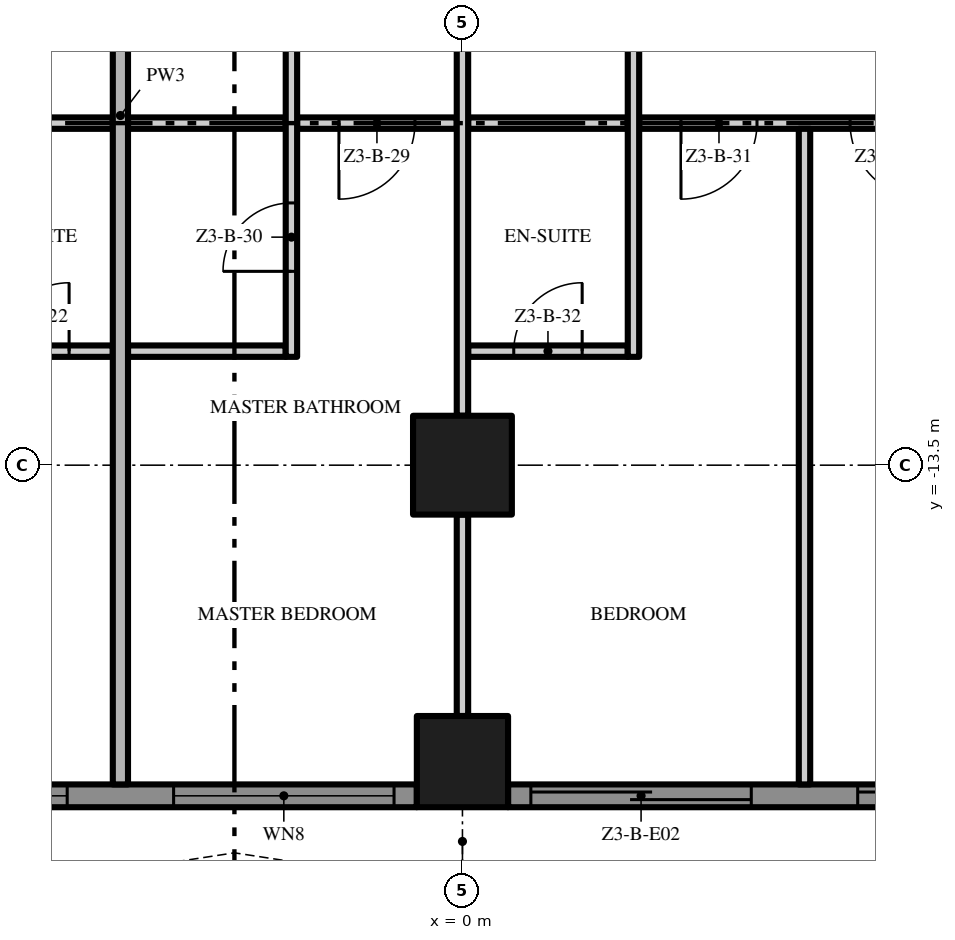
"""IFC4 building model, lengths in metres.
Left out: names, types, materials, properties, quantities, classifications, styles, units other than length and angle.
Written with IfcOpenShell. Run it as: python <this file> out.ifc"""

import sys

from ifc_helpers import new_model, si_unit, direction, frame, frame_2d, origin, origin_2d, place, context, subcontext, project, spatial, polyline, rectangle, outline, extrude, element, fill, save


model = new_model("IFC4")
c1 = context("Model", 3, precision=1e-05, world=origin(), true_north=direction((0.0, 1.0)))
c2 = subcontext(c1, "Body", "Model", "MODEL_VIEW")
j1 = project(units=[si_unit("LENGTHUNIT", "METRE"), si_unit("PLANEANGLEUNIT", "RADIAN")], contexts=[c1])
p1 = place(None, origin())
s1 = spatial("IfcSite", under=j1, at=p1, CompositionType="ELEMENT")
p2 = place(p1, origin())
s2 = spatial("IfcBuilding", under=s1, at=p2, CompositionType="ELEMENT")
p3 = place(p2, frame((0.0, 0.0, 136.4)))
s3 = spatial("IfcBuildingStorey", under=s2, at=p3, CompositionType="ELEMENT", Elevation=136.4)
p4 = place(p3, frame((0.0, -13.5, 0.0), z_axis=(0.0, 0.0, 1.0), x_axis=(1.0, 0.0, 0.0)))
e1 = element("IfcColumn", 1, at=p4, inside=s3, PredefinedType="COLUMN", context=c2, shape_type="SweptSolid", body=[
    extrude(rectangle(XDim=1.3, YDim=1.3, at=origin_2d()), origin(), (0.0, 0.0, 1.0), 3.5),
])
p5 = place(p3, frame((0.0, -17.4, 0.0), z_axis=(0.0, 0.0, 1.0), x_axis=(1.0, 0.0, 0.0)))
e2 = element("IfcColumn", 2, at=p5, inside=s3, PredefinedType="COLUMN", context=c2, shape_type="SweptSolid", body=[
    extrude(rectangle(XDim=1.2, YDim=1.2, at=origin_2d()), origin(), (0.0, 0.0, 1.0), 3.5),
])
p6 = place(p3, frame((-0.6, -17.85, 0.0), z_axis=(0.0, 0.0, 1.0), x_axis=(-1.0, 0.0, 0.0)))
e3 = element("IfcWall", 3, at=p6, inside=s3, PredefinedType="SOLIDWALL", context=c2, shape_type="SweptSolid", body=[
    extrude(rectangle(XDim=7.8, YDim=0.3, at=frame_2d((3.9, 0.0))), origin(), (0.0, 0.0, 1.0), 3.5),
])
p7 = place(p6, frame((4.6, 0.0, 0.45)))
e4 = element("IfcOpeningElement", 4, at=p7, cuts=e3, PredefinedType="OPENING", context=c2, shape_type="SweptSolid", body=[
    extrude(rectangle(XDim=2.9, YDim=2.65, at=frame_2d((1.45, 1.325))), frame((0.0, 0.16, 0.0), z_axis=(0.0, -1.0, 0.0), x_axis=(1.0, 0.0, 0.0)), (0.0, 0.0, 1.0), 0.32),
])
p8 = place(p6, frame((0.3, 0.0, 0.45)))
e5 = element("IfcOpeningElement", 5, at=p8, cuts=e3, PredefinedType="OPENING", context=c2, shape_type="SweptSolid", body=[
    extrude(rectangle(XDim=2.9, YDim=2.65, at=frame_2d((1.45, 1.325))), frame((0.0, 0.16, 0.0), z_axis=(0.0, -1.0, 0.0), x_axis=(1.0, 0.0, 0.0)), (0.0, 0.0, 1.0), 0.32),
])
p9 = place(p3, frame((8.4, -17.85, 0.0), z_axis=(0.0, 0.0, 1.0), x_axis=(-1.0, 0.0, 0.0)))
e6 = element("IfcWall", 6, at=p9, inside=s3, PredefinedType="SOLIDWALL", context=c2, shape_type="SweptSolid", body=[
    extrude(rectangle(XDim=7.8, YDim=0.3, at=frame_2d((3.9, 0.0))), origin(), (0.0, 0.0, 1.0), 3.5),
])
p10 = place(p9, frame((4.6, 0.0, 0.0)))
e7 = element("IfcOpeningElement", 7, at=p10, cuts=e6, PredefinedType="OPENING", context=c2, shape_type="SweptSolid", body=[
    extrude(rectangle(XDim=2.9, YDim=2.4, at=frame_2d((1.45, 1.2))), frame((0.0, 0.16, 0.0), z_axis=(0.0, -1.0, 0.0), x_axis=(1.0, 0.0, 0.0)), (0.0, 0.0, 1.0), 0.32),
])
p11 = place(p9, frame((0.3, 0.0, 0.0)))
e8 = element("IfcOpeningElement", 8, at=p11, cuts=e6, PredefinedType="OPENING", context=c2, shape_type="SweptSolid", body=[
    extrude(rectangle(XDim=2.9, YDim=2.4, at=frame_2d((1.45, 1.2))), frame((0.0, 0.16, 0.0), z_axis=(0.0, -1.0, 0.0), x_axis=(1.0, 0.0, 0.0)), (0.0, 0.0, 1.0), 0.32),
])
p12 = place(p3, origin())
e9 = element("IfcWall", 9, at=p12, inside=s3, PredefinedType="USERDEFINED", context=c2, shape_type="SweptSolid", body=[
    extrude(outline(polyline([(-18.0, -18.6), (-16.5, -18.829), (-15.0, -19.429), (-13.5, -20.171), (-12.0, -20.771), (-10.5, -21.0), (-9.0, -20.771), (-7.5, -20.171), (-6.0, -19.429), (-4.5, -18.829), (-3.0, -18.6), (-1.5, -18.829), (0.0, -19.429), (1.5, -20.171), (3.0, -20.771), (4.5, -21.0), (6.0, -20.771), (7.5, -20.171), (9.0, -19.429), (10.5, -18.829), (12.0, -18.6), (13.5, -18.829), (15.0, -19.429), (16.5, -20.171), (18.0, -20.771), (18.093, -20.539), (16.602, -19.942), (15.102, -19.201), (13.566, -18.586), (12.0, -18.347), (10.434, -18.586), (8.898, -19.201), (7.398, -19.942), (5.934, -20.528), (4.5, -20.747), (3.066, -20.528), (1.602, -19.942), (0.102, -19.201), (-1.434, -18.586), (-3.0, -18.347), (-4.566, -18.586), (-6.102, -19.201), (-7.602, -19.942), (-9.066, -20.528), (-10.5, -20.747), (-11.934, -20.528), (-13.398, -19.942), (-14.898, -19.201), (-16.434, -18.586), (-17.962, -18.353), (-18.0, -18.6)])), origin(), (0.0, 0.0, 1.0), 0.9),
])
p13 = place(p3, frame((-6.675, -12.0, 0.0), z_axis=(0.0, 0.0, 1.0), x_axis=(1.0, 0.0, 0.0)))
e10 = element("IfcWall", 10, at=p13, inside=s3, PredefinedType="PARTITIONING", context=c2, shape_type="SweptSolid", body=[
    extrude(rectangle(XDim=2.075, YDim=0.15, at=frame_2d((1.038, 0.0))), origin(), (0.0, 0.0, 1.0), 3.5),
])
p14 = place(p13, frame((0.6, 0.0, 0.0)))
e11 = element("IfcOpeningElement", 11, at=p14, cuts=e10, PredefinedType="OPENING", context=c2, shape_type="SweptSolid", body=[
    extrude(rectangle(XDim=0.9, YDim=2.1, at=frame_2d((0.45, 1.05))), frame((0.0, 0.085, 0.0), z_axis=(0.0, -1.0, 0.0), x_axis=(1.0, 0.0, 0.0)), (0.0, 0.0, 1.0), 0.17),
])
p15 = place(p3, frame((-4.4, -12.0, 0.0), z_axis=(0.0, 0.0, 1.0), x_axis=(1.0, 0.0, 0.0)))
e12 = element("IfcWall", 12, at=p15, inside=s3, PredefinedType="PARTITIONING", context=c2, shape_type="SweptSolid", body=[
    extrude(rectangle(XDim=2.075, YDim=0.15, at=frame_2d((1.038, 0.0))), origin(), (0.0, 0.0, 1.0), 3.5),
])
p16 = place(p3, frame((0.075, -12.0, 0.0), z_axis=(0.0, 0.0, 1.0), x_axis=(1.0, 0.0, 0.0)))
e13 = element("IfcWall", 13, at=p16, inside=s3, PredefinedType="PARTITIONING", context=c2, shape_type="SweptSolid", body=[
    extrude(rectangle(XDim=2.1, YDim=0.15, at=frame_2d((1.05, 0.0))), origin(), (0.0, 0.0, 1.0), 3.5),
])
p17 = place(p16, frame((0.6, 0.0, 0.0)))
e14 = element("IfcOpeningElement", 14, at=p17, cuts=e13, PredefinedType="OPENING", context=c2, shape_type="SweptSolid", body=[
    extrude(rectangle(XDim=0.9, YDim=2.1, at=frame_2d((0.45, 1.05))), frame((0.0, 0.085, 0.0), z_axis=(0.0, -1.0, 0.0), x_axis=(1.0, 0.0, 0.0)), (0.0, 0.0, 1.0), 0.17),
])
for number, where, z_axis, x_axis in (
    (15, (-6.675, -9.0, 0.0), (0.0, 0.0, 1.0), (1.0, 0.0, 0.0)),
    (16, (-4.4, -9.0, 0.0), (0.0, 0.0, 1.0), (1.0, 0.0, 0.0)),
):
    element("IfcWall", number, at=place(p3, frame(where, z_axis=z_axis, x_axis=x_axis)), inside=s3, PredefinedType="PARTITIONING", context=c2, shape_type="SweptSolid", body=[
        extrude(rectangle(XDim=2.075, YDim=0.15, at=frame_2d((1.038, 0.0))), origin(), (0.0, 0.0, 1.0), 3.5),
    ])
p18 = place(p3, frame((-0.075, -9.0, 0.0), z_axis=(0.0, 0.0, 1.0), x_axis=(-1.0, 0.0, 0.0)))
e17 = element("IfcWall", 17, at=p18, inside=s3, PredefinedType="PARTITIONING", context=c2, shape_type="SweptSolid", body=[
    extrude(rectangle(XDim=2.1, YDim=0.15, at=frame_2d((1.05, 0.0))), origin(), (0.0, 0.0, 1.0), 3.5),
])
p19 = place(p18, frame((0.55, 0.0, 0.0)))
e18 = element("IfcOpeningElement", 18, at=p19, cuts=e17, PredefinedType="OPENING", context=c2, shape_type="SweptSolid", body=[
    extrude(rectangle(XDim=1.0, YDim=2.4, at=frame_2d((0.5, 1.2))), frame((0.0, 0.085, 0.0), z_axis=(0.0, -1.0, 0.0), x_axis=(1.0, 0.0, 0.0)), (0.0, 0.0, 1.0), 0.17),
])
p20 = place(p3, frame((0.075, -9.0, 0.0), z_axis=(0.0, 0.0, 1.0), x_axis=(1.0, 0.0, 0.0)))
e19 = element("IfcWall", 19, at=p20, inside=s3, PredefinedType="PARTITIONING", context=c2, shape_type="SweptSolid", body=[
    extrude(rectangle(XDim=2.1, YDim=0.15, at=frame_2d((1.05, 0.0))), origin(), (0.0, 0.0, 1.0), 3.5),
])
p21 = place(p3, frame((6.675, -9.0, 0.0), z_axis=(0.0, 0.0, 1.0), x_axis=(-1.0, 0.0, 0.0)))
e20 = element("IfcWall", 20, at=p21, inside=s3, PredefinedType="PARTITIONING", context=c2, shape_type="SweptSolid", body=[
    extrude(rectangle(XDim=4.35, YDim=0.15, at=frame_2d((2.175, 0.0))), origin(), (0.0, 0.0, 1.0), 3.5),
])
p22 = place(p21, frame((2.8, 0.0, 0.0)))
e21 = element("IfcOpeningElement", 21, at=p22, cuts=e20, PredefinedType="OPENING", context=c2, shape_type="SweptSolid", body=[
    extrude(rectangle(XDim=1.0, YDim=2.4, at=frame_2d((0.5, 1.2))), frame((0.0, 0.085, 0.0), z_axis=(0.0, -1.0, 0.0), x_axis=(1.0, 0.0, 0.0)), (0.0, 0.0, 1.0), 0.17),
])
p23 = place(p21, frame((0.575, 0.0, 0.0)))
e22 = element("IfcOpeningElement", 22, at=p23, cuts=e20, PredefinedType="OPENING", context=c2, shape_type="SweptSolid", body=[
    extrude(rectangle(XDim=1.0, YDim=2.4, at=frame_2d((0.5, 1.2))), frame((0.0, 0.085, 0.0), z_axis=(0.0, -1.0, 0.0), x_axis=(1.0, 0.0, 0.0)), (0.0, 0.0, 1.0), 0.17),
])
p24 = place(p3, frame((-4.5, -17.7, 0.0), z_axis=(0.0, 0.0, 1.0), x_axis=(0.0, 1.0, 0.0)))
e23 = element("IfcWall", 23, at=p24, inside=s3, PredefinedType="PARTITIONING", context=c2, shape_type="SweptSolid", body=[
    extrude(rectangle(XDim=17.6, YDim=0.2, at=frame_2d((8.8, 0.0))), origin(), (0.0, 0.0, 1.0), 3.5),
])
p25 = place(p3, frame((-2.25, -12.075, 0.0), z_axis=(0.0, 0.0, 1.0), x_axis=(0.0, 1.0, 0.0)))
e24 = element("IfcWall", 24, at=p25, inside=s3, PredefinedType="PARTITIONING", context=c2, shape_type="SweptSolid", body=[
    extrude(rectangle(XDim=7.65, YDim=0.15, at=frame_2d((3.825, 0.0))), origin(), (0.0, 0.0, 1.0), 3.5),
])
p26 = place(p25, frame((4.875, 0.0, 0.0)))
e25 = element("IfcOpeningElement", 25, at=p26, cuts=e24, PredefinedType="OPENING", context=c2, shape_type="SweptSolid", body=[
    extrude(rectangle(XDim=0.9, YDim=2.1, at=frame_2d((0.45, 1.05))), frame((0.0, 0.085, 0.0), z_axis=(0.0, -1.0, 0.0), x_axis=(1.0, 0.0, 0.0)), (0.0, 0.0, 1.0), 0.17),
])
p27 = place(p25, frame((1.125, 0.0, 0.0)))
e26 = element("IfcOpeningElement", 26, at=p27, cuts=e24, PredefinedType="OPENING", context=c2, shape_type="SweptSolid", body=[
    extrude(rectangle(XDim=0.9, YDim=2.1, at=frame_2d((0.45, 1.05))), frame((0.0, 0.085, 0.0), z_axis=(0.0, -1.0, 0.0), x_axis=(1.0, 0.0, 0.0)), (0.0, 0.0, 1.0), 0.17),
])
p28 = place(p3, frame((0.0, -16.8, 0.0), z_axis=(0.0, 0.0, 1.0), x_axis=(0.0, 1.0, 0.0)))
e27 = element("IfcWall", 27, at=p28, inside=s3, PredefinedType="PARTITIONING", context=c2, shape_type="SweptSolid", body=[
    extrude(rectangle(XDim=2.65, YDim=0.15, at=frame_2d((1.325, 0.0))), origin(), (0.0, 0.0, 1.0), 3.5),
])
p29 = place(p3, frame((0.0, -12.85, 0.0), z_axis=(0.0, 0.0, 1.0), x_axis=(0.0, 1.0, 0.0)))
e28 = element("IfcWall", 28, at=p29, inside=s3, PredefinedType="PARTITIONING", context=c2, shape_type="SweptSolid", body=[
    extrude(rectangle(XDim=7.7, YDim=0.15, at=frame_2d((3.85, 0.0))), origin(), (0.0, 0.0, 1.0), 3.5),
])
p30 = place(p3, frame((2.25, -12.075, 0.0), z_axis=(0.0, 0.0, 1.0), x_axis=(0.0, 1.0, 0.0)))
e29 = element("IfcWall", 29, at=p30, inside=s3, PredefinedType="PARTITIONING", context=c2, shape_type="SweptSolid", body=[
    extrude(rectangle(XDim=7.65, YDim=0.15, at=frame_2d((3.825, 0.0))), origin(), (0.0, 0.0, 1.0), 3.5),
])
p31 = place(p3, frame((4.5, -17.7, 0.0), z_axis=(0.0, 0.0, 1.0), x_axis=(0.0, 1.0, 0.0)))
e30 = element("IfcWall", 30, at=p31, inside=s3, PredefinedType="PARTITIONING", context=c2, shape_type="SweptSolid", body=[
    extrude(rectangle(XDim=8.625, YDim=0.15, at=frame_2d((4.312, 0.0))), origin(), (0.0, 0.0, 1.0), 3.5),
])
p32 = place(p7, origin())
e31 = element("IfcWindow", 31, at=p32, inside=s3, PartitioningType="SINGLE_PANEL", PredefinedType="WINDOW", context=c2, shape_type="SweptSolid", body=[
    extrude(rectangle(XDim=2.9, YDim=2.65, at=frame_2d((1.45, 1.325))), frame((0.0, 0.03, 0.0), z_axis=(0.0, -1.0, 0.0), x_axis=(1.0, 0.0, 0.0)), (0.0, 0.0, 1.0), 0.06),
])
fill(e4, e31)
p33 = place(p8, origin())
e32 = element("IfcWindow", 32, at=p33, inside=s3, PartitioningType="SINGLE_PANEL", PredefinedType="WINDOW", context=c2, shape_type="SweptSolid", body=[
    extrude(rectangle(XDim=2.9, YDim=2.65, at=frame_2d((1.45, 1.325))), frame((0.0, 0.03, 0.0), z_axis=(0.0, -1.0, 0.0), x_axis=(1.0, 0.0, 0.0)), (0.0, 0.0, 1.0), 0.06),
])
fill(e5, e32)
p34 = place(p10, origin())
e33 = element("IfcDoor", 33, at=p34, inside=s3, OperationType="SINGLE_SWING_LEFT", PredefinedType="DOOR", context=c2, shape_type="SweptSolid", body=[
    extrude(rectangle(XDim=2.9, YDim=2.4, at=frame_2d((1.45, 1.2))), frame((0.0, 0.025, 0.0), z_axis=(0.0, -1.0, 0.0), x_axis=(1.0, 0.0, 0.0)), (0.0, 0.0, 1.0), 0.05),
])
fill(e7, e33)
p35 = place(p11, origin())
e34 = element("IfcDoor", 34, at=p35, inside=s3, OperationType="SINGLE_SWING_LEFT", PredefinedType="DOOR", context=c2, shape_type="SweptSolid", body=[
    extrude(rectangle(XDim=2.9, YDim=2.4, at=frame_2d((1.45, 1.2))), frame((0.0, 0.025, 0.0), z_axis=(0.0, -1.0, 0.0), x_axis=(1.0, 0.0, 0.0)), (0.0, 0.0, 1.0), 0.05),
])
fill(e8, e34)
p36 = place(p14, origin())
e35 = element("IfcDoor", 35, at=p36, inside=s3, OperationType="SINGLE_SWING_RIGHT", PredefinedType="DOOR", context=c2, shape_type="SweptSolid", body=[
    extrude(rectangle(XDim=0.9, YDim=2.1, at=frame_2d((0.45, 1.05))), frame((0.0, 0.025, 0.0), z_axis=(0.0, -1.0, 0.0), x_axis=(1.0, 0.0, 0.0)), (0.0, 0.0, 1.0), 0.05),
])
fill(e11, e35)
p37 = place(p19, origin())
e36 = element("IfcDoor", 36, at=p37, inside=s3, OperationType="SINGLE_SWING_RIGHT", PredefinedType="DOOR", context=c2, shape_type="SweptSolid", body=[
    extrude(rectangle(XDim=1.0, YDim=2.4, at=frame_2d((0.5, 1.2))), frame((0.0, 0.025, 0.0), z_axis=(0.0, -1.0, 0.0), x_axis=(1.0, 0.0, 0.0)), (0.0, 0.0, 1.0), 0.05),
])
fill(e18, e36)
p38 = place(p27, origin())
e37 = element("IfcDoor", 37, at=p38, inside=s3, OperationType="SINGLE_SWING_LEFT", PredefinedType="DOOR", context=c2, shape_type="SweptSolid", body=[
    extrude(rectangle(XDim=0.9, YDim=2.1, at=frame_2d((0.45, 1.05))), frame((0.0, 0.025, 0.0), z_axis=(0.0, -1.0, 0.0), x_axis=(1.0, 0.0, 0.0)), (0.0, 0.0, 1.0), 0.05),
])
fill(e26, e37)
p39 = place(p22, origin())
e38 = element("IfcDoor", 38, at=p39, inside=s3, OperationType="SINGLE_SWING_RIGHT", PredefinedType="DOOR", context=c2, shape_type="SweptSolid", body=[
    extrude(rectangle(XDim=1.0, YDim=2.4, at=frame_2d((0.5, 1.2))), frame((0.0, 0.025, 0.0), z_axis=(0.0, -1.0, 0.0), x_axis=(1.0, 0.0, 0.0)), (0.0, 0.0, 1.0), 0.05),
])
fill(e21, e38)
p40 = place(p17, origin())
e39 = element("IfcDoor", 39, at=p40, inside=s3, OperationType="SINGLE_SWING_RIGHT", PredefinedType="DOOR", context=c2, shape_type="SweptSolid", body=[
    extrude(rectangle(XDim=0.9, YDim=2.1, at=frame_2d((0.45, 1.05))), frame((0.0, 0.025, 0.0), z_axis=(0.0, -1.0, 0.0), x_axis=(1.0, 0.0, 0.0)), (0.0, 0.0, 1.0), 0.05),
])
fill(e14, e39)
p41 = place(p23, origin())
e40 = element("IfcDoor", 40, at=p41, inside=s3, OperationType="SINGLE_SWING_LEFT", PredefinedType="DOOR", context=c2, shape_type="SweptSolid", body=[
    extrude(rectangle(XDim=1.0, YDim=2.4, at=frame_2d((0.5, 1.2))), frame((0.0, 0.025, 0.0), z_axis=(0.0, -1.0, 0.0), x_axis=(1.0, 0.0, 0.0)), (0.0, 0.0, 1.0), 0.05),
])
fill(e22, e40)
save(model, sys.argv[1])
